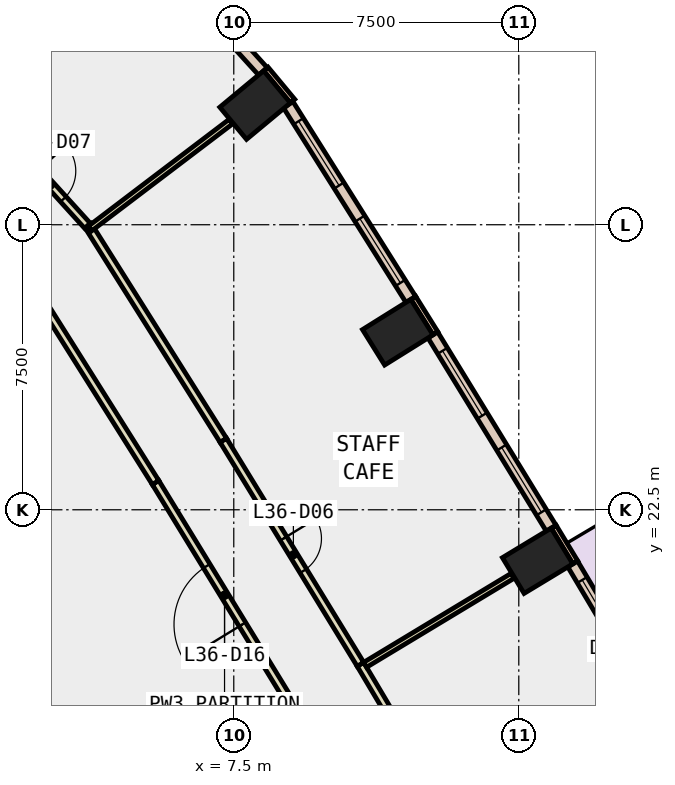
"""IFC4 building model, lengths in metres.
Left out: names, types, materials, properties, quantities, classifications, styles, units other than length and angle.
Written with IfcOpenShell. Run it as: python <this file> out.ifc"""

import sys

from ifc_helpers import new_model, si_unit, direction, frame, frame_2d, origin, origin_2d, place, context, subcontext, project, spatial, rectangle, extrude, element, fill, save


model = new_model("IFC4")
c1 = context("Model", 3, precision=1e-05, world=origin(), true_north=direction((0.0, 1.0)))
c2 = subcontext(c1, "Body", "Model", "MODEL_VIEW")
j1 = project(units=[si_unit("LENGTHUNIT", "METRE"), si_unit("PLANEANGLEUNIT", "RADIAN")], contexts=[c1])
p1 = place(None, origin())
s1 = spatial("IfcSite", under=j1, at=p1, CompositionType="ELEMENT")
p2 = place(p1, origin())
s2 = spatial("IfcBuilding", under=s1, at=p2, CompositionType="ELEMENT")
p3 = place(p2, frame((0.0, 0.0, 163.4)))
s3 = spatial("IfcBuildingStorey", under=s2, at=p3, CompositionType="ELEMENT", Elevation=163.4)
for number, where, z_axis, x_axis in (
    (1, (15.496, 21.158, -0.4), (0.0, 0.0, 1.0), (-0.518, 0.855, 0.0)),
    (2, (11.815, 27.172, -0.4), (0.0, 0.0, 1.0), (-0.53, 0.848, 0.0)),
    (3, (8.061, 33.149, -0.4), (0.0, 0.0, 1.0), (-0.639, 0.769, 0.0)),
):
    element("IfcColumn", number, at=place(p3, frame(where, z_axis=z_axis, x_axis=x_axis)), inside=s3, PredefinedType="COLUMN", context=c2, shape_type="SweptSolid", body=[
        extrude(rectangle(XDim=1.1, YDim=1.5, at=origin_2d()), origin(), (0.0, 0.0, 1.0), 4.2),
    ])
for number, where, z_axis, x_axis in (
    (4, (16.487, 21.115, 0.0), (0.0, 0.0, 1.0), (-0.518, 0.855, 0.0)),
    (5, (12.806, 27.143, 0.0), (0.0, 0.0, 1.0), (-0.53, 0.848, 0.0)),
    (6, (9.047, 33.253, 0.0), (0.0, 0.0, 1.0), (-0.639, 0.769, 0.0)),
):
    element("IfcWall", number, at=place(p3, frame(where, z_axis=z_axis, x_axis=x_axis)), inside=s3, PredefinedType="STANDARD", context=c2, shape_type="SweptSolid", body=[
        extrude(rectangle(XDim=1.1, YDim=0.15, at=frame_2d((0.55, 0.0))), origin(), (0.0, 0.0, 1.0), 3.8),
    ])
p4 = place(p3, frame((19.465, 15.949, 0.0), z_axis=(0.0, 0.0, 1.0), x_axis=(-0.511053317394, 0.8595490136, 0.0)))
e7 = element("IfcWall", 7, at=p4, inside=s3, PredefinedType="STANDARD", context=c2, shape_type="SweptSolid", body=[
    extrude(rectangle(XDim=5.962, YDim=0.3, at=frame_2d((2.981, 0.0))), origin(), (0.0, 0.0, 1.0), 3.8),
])
p5 = place(p4, frame((0.491, 0.0, 0.0)))
e8 = element("IfcOpeningElement", 8, at=p5, cuts=e7, PredefinedType="OPENING", context=c2, shape_type="SweptSolid", body=[
    extrude(rectangle(XDim=2.0, YDim=2.4, at=frame_2d((1.0, 1.2))), frame((0.0, 0.16, 0.0), z_axis=(0.0, -1.0, 0.0), x_axis=(1.0, 0.0, 0.0)), (0.0, 0.0, 1.0), 0.32),
])
p6 = place(p4, frame((3.472, 0.0, 0.9)))
e9 = element("IfcOpeningElement", 9, at=p6, cuts=e7, PredefinedType="OPENING", context=c2, shape_type="SweptSolid", body=[
    extrude(rectangle(XDim=2.0, YDim=2.6, at=frame_2d((1.0, 1.3))), frame((0.0, 0.16, 0.0), z_axis=(0.0, -1.0, 0.0), x_axis=(1.0, 0.0, 0.0)), (0.0, 0.0, 1.0), 0.32),
])
p7 = place(p3, frame((15.851, 22.015, 0.0), z_axis=(0.0, 0.0, 1.0), x_axis=(-0.522156898008, 0.852849443842, 0.0)))
e10 = element("IfcWall", 10, at=p7, inside=s3, PredefinedType="STANDARD", context=c2, shape_type="SweptSolid", body=[
    extrude(rectangle(XDim=5.964, YDim=0.3, at=frame_2d((2.982, 0.0))), origin(), (0.0, 0.0, 1.0), 3.8),
])
p8 = place(p7, frame((0.491, 0.0, 0.9)))
e11 = element("IfcOpeningElement", 11, at=p8, cuts=e10, PredefinedType="OPENING", context=c2, shape_type="SweptSolid", body=[
    extrude(rectangle(XDim=2.0, YDim=2.6, at=frame_2d((1.0, 1.3))), frame((0.0, 0.16, 0.0), z_axis=(0.0, -1.0, 0.0), x_axis=(1.0, 0.0, 0.0)), (0.0, 0.0, 1.0), 0.32),
])
p9 = place(p7, frame((3.473, 0.0, 0.9)))
e12 = element("IfcOpeningElement", 12, at=p9, cuts=e10, PredefinedType="OPENING", context=c2, shape_type="SweptSolid", body=[
    extrude(rectangle(XDim=2.0, YDim=2.6, at=frame_2d((1.0, 1.3))), frame((0.0, 0.16, 0.0), z_axis=(0.0, -1.0, 0.0), x_axis=(1.0, 0.0, 0.0)), (0.0, 0.0, 1.0), 0.32),
])
p10 = place(p3, frame((12.158, 28.034, 0.0), z_axis=(0.0, 0.0, 1.0), x_axis=(-0.532721310512, 0.846290733334, 0.0)))
e13 = element("IfcWall", 13, at=p10, inside=s3, PredefinedType="STANDARD", context=c2, shape_type="SweptSolid", body=[
    extrude(rectangle(XDim=6.056, YDim=0.3, at=frame_2d((3.028, 0.0))), origin(), (0.0, 0.0, 1.0), 3.8),
])
p11 = place(p10, frame((0.514, 0.0, 0.9)))
e14 = element("IfcOpeningElement", 14, at=p11, cuts=e13, PredefinedType="OPENING", context=c2, shape_type="SweptSolid", body=[
    extrude(rectangle(XDim=2.0, YDim=2.6, at=frame_2d((1.0, 1.3))), frame((0.0, 0.16, 0.0), z_axis=(0.0, -1.0, 0.0), x_axis=(1.0, 0.0, 0.0)), (0.0, 0.0, 1.0), 0.32),
])
p12 = place(p10, frame((3.542, 0.0, 0.9)))
e15 = element("IfcOpeningElement", 15, at=p12, cuts=e13, PredefinedType="OPENING", context=c2, shape_type="SweptSolid", body=[
    extrude(rectangle(XDim=2.0, YDim=2.6, at=frame_2d((1.0, 1.3))), frame((0.0, 0.16, 0.0), z_axis=(0.0, -1.0, 0.0), x_axis=(1.0, 0.0, 0.0)), (0.0, 0.0, 1.0), 0.32),
])
p13 = place(p3, frame((8.268, 34.035, 0.0), z_axis=(0.0, 0.0, 1.0), x_axis=(-0.672034341329, 0.740519982225, 0.0)))
e16 = element("IfcWall", 16, at=p13, inside=s3, PredefinedType="STANDARD", context=c2, shape_type="SweptSolid", body=[
    extrude(rectangle(XDim=4.018, YDim=0.3, at=frame_2d((2.009, 0.0))), origin(), (0.0, 0.0, 1.0), 3.8),
])
p14 = place(p13, frame((1.309, 0.0, 0.9)))
e17 = element("IfcOpeningElement", 17, at=p14, cuts=e16, PredefinedType="OPENING", context=c2, shape_type="SweptSolid", body=[
    extrude(rectangle(XDim=1.4, YDim=2.6, at=frame_2d((0.7, 1.3))), frame((0.0, 0.16, 0.0), z_axis=(0.0, -1.0, 0.0), x_axis=(1.0, 0.0, 0.0)), (0.0, 0.0, 1.0), 0.32),
])
p15 = place(p3, frame((9.073, 17.285, 0.0), z_axis=(0.0, 0.0, 1.0), x_axis=(-0.522108536257, 0.85287905143, 0.0)))
e18 = element("IfcWall", 18, at=p15, inside=s3, PredefinedType="PARTITIONING", context=c2, shape_type="SweptSolid", body=[
    extrude(rectangle(XDim=6.957, YDim=0.2, at=frame_2d((3.478, 0.0))), origin(), (0.0, 0.0, 1.0), 3.8),
])
p16 = place(p15, frame((2.578, 0.0, 0.0)))
e19 = element("IfcOpeningElement", 19, at=p16, cuts=e18, PredefinedType="OPENING", context=c2, shape_type="SweptSolid", body=[
    extrude(rectangle(XDim=1.8, YDim=2.1, at=frame_2d((0.9, 1.05))), frame((0.0, 0.11, 0.0), z_axis=(0.0, -1.0, 0.0), x_axis=(1.0, 0.0, 0.0)), (0.0, 0.0, 1.0), 0.22),
])
p17 = place(p3, frame((5.441, 23.218, 0.0), z_axis=(0.0, 0.0, 1.0), x_axis=(-0.532786324951, 0.846249804694, 0.0)))
e20 = element("IfcWall", 20, at=p17, inside=s3, PredefinedType="PARTITIONING", context=c2, shape_type="SweptSolid", body=[
    extrude(rectangle(XDim=6.489, YDim=0.2, at=frame_2d((3.244, 0.0))), origin(), (0.0, 0.0, 1.0), 3.8),
])
p18 = place(p3, frame((10.833, 18.434, 0.0), z_axis=(0.0, 0.0, 1.0), x_axis=(0.510975915649, -0.859595028852, 0.0)))
e21 = element("IfcWall", 21, at=p18, inside=s3, PredefinedType="PARTITIONING", context=c2, shape_type="SweptSolid", body=[
    extrude(rectangle(XDim=7.057, YDim=0.2, at=frame_2d((3.528, 0.0))), origin(), (0.0, 0.0, 1.0), 3.8),
])
p19 = place(p18, frame((3.028, 0.0, 0.0)))
e22 = element("IfcOpeningElement", 22, at=p19, cuts=e21, PredefinedType="OPENING", context=c2, shape_type="SweptSolid", body=[
    extrude(rectangle(XDim=1.0, YDim=2.1, at=frame_2d((0.5, 1.05))), frame((0.0, 0.11, 0.0), z_axis=(0.0, -1.0, 0.0), x_axis=(1.0, 0.0, 0.0)), (0.0, 0.0, 1.0), 0.22),
])
p20 = place(p3, frame((3.663, 29.984, 0.0), z_axis=(0.0, 0.0, 1.0), x_axis=(0.532874279134, -0.846194423662, 0.0)))
e23 = element("IfcWall", 23, at=p20, inside=s3, PredefinedType="PARTITIONING", context=c2, shape_type="SweptSolid", body=[
    extrude(rectangle(XDim=6.686, YDim=0.2, at=frame_2d((3.343, 0.0))), origin(), (0.0, 0.0, 1.0), 3.8),
])
p21 = place(p3, frame((7.226, 24.326, 0.0), z_axis=(0.0, 0.0, 1.0), x_axis=(0.52212028524, -0.852871858922, 0.0)))
e24 = element("IfcWall", 24, at=p21, inside=s3, PredefinedType="PARTITIONING", context=c2, shape_type="SweptSolid", body=[
    extrude(rectangle(XDim=6.908, YDim=0.2, at=frame_2d((3.454, 0.0))), origin(), (0.0, 0.0, 1.0), 3.8),
])
p22 = place(p21, frame((3.029, 0.0, 0.0)))
e25 = element("IfcOpeningElement", 25, at=p22, cuts=e24, PredefinedType="OPENING", context=c2, shape_type="SweptSolid", body=[
    extrude(rectangle(XDim=1.0, YDim=2.1, at=frame_2d((0.5, 1.05))), frame((0.0, 0.11, 0.0), z_axis=(0.0, -1.0, 0.0), x_axis=(1.0, 0.0, 0.0)), (0.0, 0.0, 1.0), 0.22),
])
p23 = place(p3, frame((1.708, 32.112, 0.0), z_axis=(0.0, 0.0, 1.0), x_axis=(0.671957285765, -0.740589904135, 0.0)))
e26 = element("IfcWall", 26, at=p23, inside=s3, PredefinedType="PARTITIONING", context=c2, shape_type="SweptSolid", body=[
    extrude(rectangle(XDim=2.888, YDim=0.2, at=frame_2d((1.444, 0.0))), origin(), (0.0, 0.0, 1.0), 3.8),
])
p24 = place(p23, frame((0.944, 0.0, 0.0)))
e27 = element("IfcOpeningElement", 27, at=p24, cuts=e26, PredefinedType="OPENING", context=c2, shape_type="SweptSolid", body=[
    extrude(rectangle(XDim=1.0, YDim=2.1, at=frame_2d((0.5, 1.05))), frame((0.0, 0.11, 0.0), z_axis=(0.0, -1.0, 0.0), x_axis=(1.0, 0.0, 0.0)), (0.0, 0.0, 1.0), 0.22),
])
p25 = place(p3, frame((10.957, 18.421, 0.0), z_axis=(0.0, 0.0, 1.0), x_axis=(0.85624931053, 0.516562792134, 0.0)))
e28 = element("IfcWall", 28, at=p25, inside=s3, PredefinedType="PARTITIONING", context=c2, shape_type="SweptSolid", body=[
    extrude(rectangle(XDim=4.53, YDim=0.15, at=frame_2d((2.265, 0.0))), origin(), (0.0, 0.0, 1.0), 3.8),
])
p26 = place(p3, frame((3.716, 29.899, 0.0), z_axis=(0.0, 0.0, 1.0), x_axis=(0.796435085709, 0.604724031481, 0.0)))
e29 = element("IfcWall", 29, at=p26, inside=s3, PredefinedType="PARTITIONING", context=c2, shape_type="SweptSolid", body=[
    extrude(rectangle(XDim=4.653, YDim=0.15, at=frame_2d((2.327, 0.0))), origin(), (0.0, 0.0, 1.0), 3.8),
])
p27 = place(p6, origin())
e30 = element("IfcWindow", 30, at=p27, inside=s3, PartitioningType="SINGLE_PANEL", PredefinedType="WINDOW", context=c2, shape_type="SweptSolid", body=[
    extrude(rectangle(XDim=2.0, YDim=2.6, at=frame_2d((1.0, 1.3))), frame((0.0, 0.03, 0.0), z_axis=(0.0, -1.0, 0.0), x_axis=(1.0, 0.0, 0.0)), (0.0, 0.0, 1.0), 0.06),
])
fill(e9, e30)
p28 = place(p8, origin())
e31 = element("IfcWindow", 31, at=p28, inside=s3, PartitioningType="SINGLE_PANEL", PredefinedType="WINDOW", context=c2, shape_type="SweptSolid", body=[
    extrude(rectangle(XDim=2.0, YDim=2.6, at=frame_2d((1.0, 1.3))), frame((0.0, 0.03, 0.0), z_axis=(0.0, -1.0, 0.0), x_axis=(1.0, 0.0, 0.0)), (0.0, 0.0, 1.0), 0.06),
])
fill(e11, e31)
p29 = place(p9, origin())
e32 = element("IfcWindow", 32, at=p29, inside=s3, PartitioningType="SINGLE_PANEL", PredefinedType="WINDOW", context=c2, shape_type="SweptSolid", body=[
    extrude(rectangle(XDim=2.0, YDim=2.6, at=frame_2d((1.0, 1.3))), frame((0.0, 0.03, 0.0), z_axis=(0.0, -1.0, 0.0), x_axis=(1.0, 0.0, 0.0)), (0.0, 0.0, 1.0), 0.06),
])
fill(e12, e32)
p30 = place(p11, origin())
e33 = element("IfcWindow", 33, at=p30, inside=s3, PartitioningType="SINGLE_PANEL", PredefinedType="WINDOW", context=c2, shape_type="SweptSolid", body=[
    extrude(rectangle(XDim=2.0, YDim=2.6, at=frame_2d((1.0, 1.3))), frame((0.0, 0.03, 0.0), z_axis=(0.0, -1.0, 0.0), x_axis=(1.0, 0.0, 0.0)), (0.0, 0.0, 1.0), 0.06),
])
fill(e14, e33)
p31 = place(p12, origin())
e34 = element("IfcWindow", 34, at=p31, inside=s3, PartitioningType="SINGLE_PANEL", PredefinedType="WINDOW", context=c2, shape_type="SweptSolid", body=[
    extrude(rectangle(XDim=2.0, YDim=2.6, at=frame_2d((1.0, 1.3))), frame((0.0, 0.03, 0.0), z_axis=(0.0, -1.0, 0.0), x_axis=(1.0, 0.0, 0.0)), (0.0, 0.0, 1.0), 0.06),
])
fill(e15, e34)
p32 = place(p22, origin())
e35 = element("IfcDoor", 35, at=p32, inside=s3, OperationType="SINGLE_SWING_RIGHT", PredefinedType="DOOR", context=c2, shape_type="SweptSolid", body=[
    extrude(rectangle(XDim=1.0, YDim=2.1, at=frame_2d((0.5, 1.05))), frame((0.0, 0.025, 0.0), z_axis=(0.0, -1.0, 0.0), x_axis=(1.0, 0.0, 0.0)), (0.0, 0.0, 1.0), 0.05),
])
fill(e25, e35)
p33 = place(p24, origin())
e36 = element("IfcDoor", 36, at=p33, inside=s3, OperationType="SINGLE_SWING_LEFT", PredefinedType="DOOR", context=c2, shape_type="SweptSolid", body=[
    extrude(rectangle(XDim=1.0, YDim=2.1, at=frame_2d((0.5, 1.05))), frame((0.0, 0.025, 0.0), z_axis=(0.0, -1.0, 0.0), x_axis=(1.0, 0.0, 0.0)), (0.0, 0.0, 1.0), 0.05),
])
fill(e27, e36)
p34 = place(p16, origin())
e37 = element("IfcDoor", 37, at=p34, inside=s3, OperationType="DOUBLE_DOOR_SINGLE_SWING", PredefinedType="DOOR", context=c2, shape_type="SweptSolid", body=[
    extrude(rectangle(XDim=1.8, YDim=2.1, at=frame_2d((0.9, 1.05))), frame((0.0, 0.025, 0.0), z_axis=(0.0, -1.0, 0.0), x_axis=(1.0, 0.0, 0.0)), (0.0, 0.0, 1.0), 0.05),
])
fill(e19, e37)
save(model, sys.argv[1])
